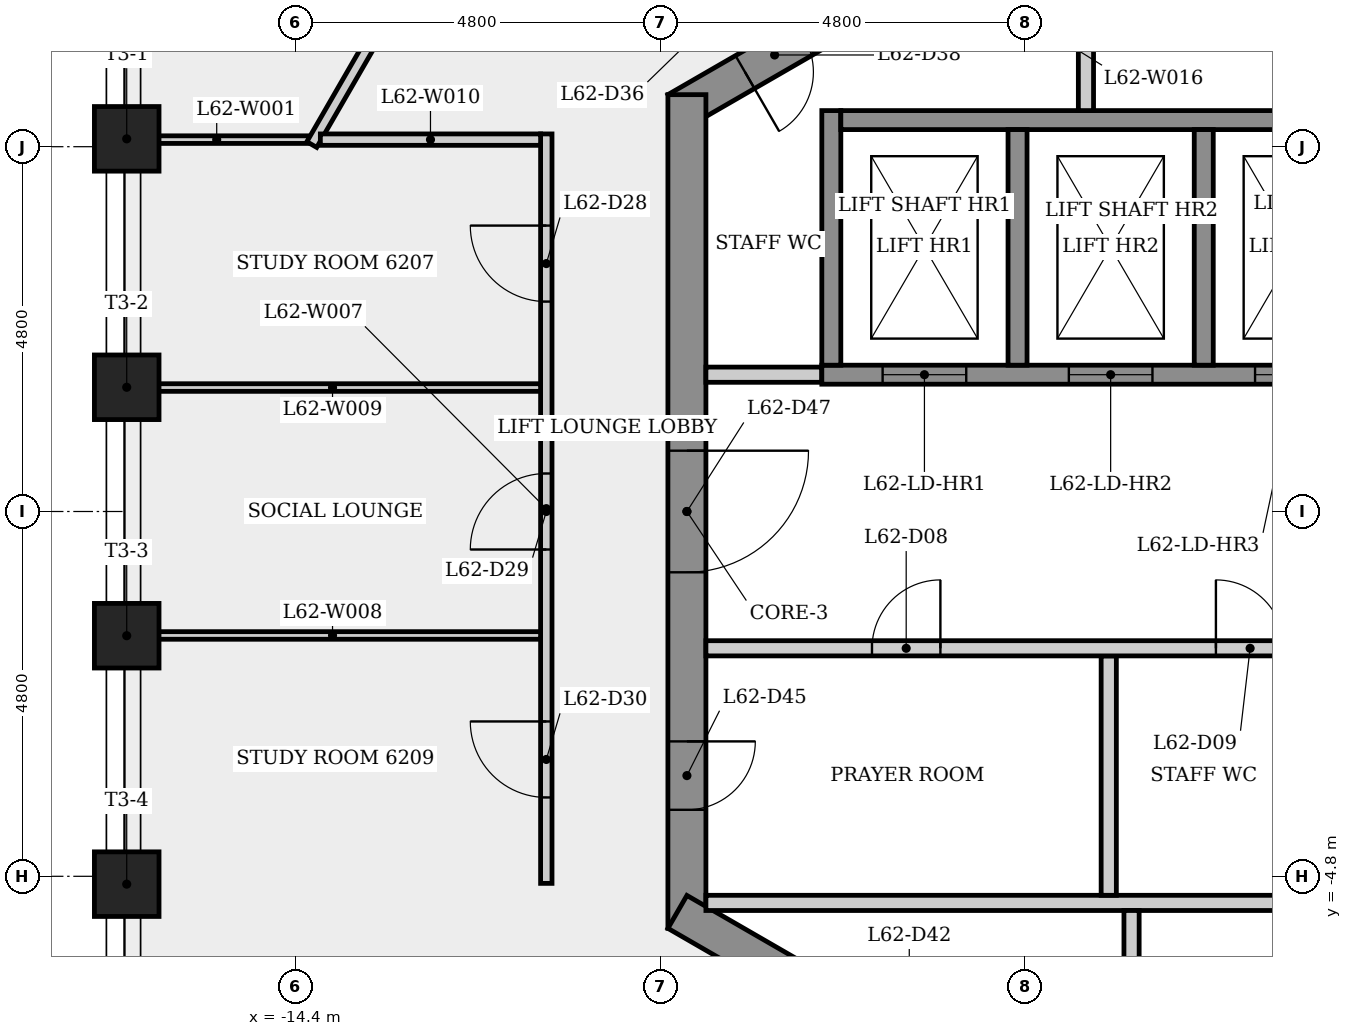
"""IFC4 building model, lengths in metres.
Left out: names, types, materials, properties, quantities, classifications, styles, units other than length and angle.
Written with IfcOpenShell. Run it as: python <this file> out.ifc"""

import sys

from ifc_helpers import new_model, si_unit, direction, frame, frame_2d, origin, origin_2d, place, context, subcontext, project, spatial, rectangle, extrude, element, fill, save


model = new_model("IFC4")
c1 = context("Model", 3, precision=1e-05, world=origin(), true_north=direction((0.0, 1.0)))
c2 = subcontext(c1, "Body", "Model", "MODEL_VIEW")
j1 = project(units=[si_unit("LENGTHUNIT", "METRE"), si_unit("PLANEANGLEUNIT", "RADIAN")], contexts=[c1])
p1 = place(None, origin())
s1 = spatial("IfcSite", under=j1, at=p1, CompositionType="ELEMENT")
p2 = place(p1, origin())
s2 = spatial("IfcBuilding", under=s1, at=p2, CompositionType="ELEMENT")
p3 = place(p2, frame((0.0, 0.0, 232.5)))
s3 = spatial("IfcBuildingStorey", under=s2, at=p3, CompositionType="ELEMENT", Elevation=232.5)
p4 = place(p3, frame((0.125, 10.753, 0.0), z_axis=(0.0, 0.0, 1.0), x_axis=(-0.866023993627, -0.500002442456, 0.0)))
e1 = element("IfcWall", 1, at=p4, inside=s3, PredefinedType="SHEAR", context=c2, shape_type="SweptSolid", body=[
    extrude(rectangle(XDim=10.97, YDim=0.5, at=frame_2d((5.485, 0.0))), origin(), (0.0, 0.0, 1.0), 3.4),
])
p5 = place(p4, frame((9.043, 0.0, 0.0)))
e2 = element("IfcOpeningElement", 2, at=p5, cuts=e1, PredefinedType="OPENING", context=c2, shape_type="SweptSolid", body=[
    extrude(rectangle(XDim=0.9, YDim=2.1, at=frame_2d((0.45, 1.05))), frame((0.0, 0.26, 0.0), z_axis=(0.0, -1.0, 0.0), x_axis=(1.0, 0.0, 0.0)), (0.0, 0.0, 1.0), 0.52),
])
p6 = place(p4, frame((2.38, 0.0, 0.0)))
e3 = element("IfcOpeningElement", 3, at=p6, cuts=e1, PredefinedType="OPENING", context=c2, shape_type="SweptSolid", body=[
    extrude(rectangle(XDim=0.9, YDim=2.1, at=frame_2d((0.45, 1.05))), frame((0.0, 0.26, 0.0), z_axis=(0.0, -1.0, 0.0), x_axis=(1.0, 0.0, 0.0)), (0.0, 0.0, 1.0), 0.52),
])
p7 = place(p3, frame((-9.25, 5.485, 0.0), z_axis=(0.0, 0.0, 1.0), x_axis=(0.0, -1.0, 0.0)))
e4 = element("IfcWall", 4, at=p7, inside=s3, PredefinedType="SHEAR", context=c2, shape_type="SweptSolid", body=[
    extrude(rectangle(XDim=10.97, YDim=0.5, at=frame_2d((5.485, 0.0))), origin(), (0.0, 0.0, 1.0), 3.4),
])
p8 = place(p7, frame((8.51, 0.0, 0.0)))
e5 = element("IfcOpeningElement", 5, at=p8, cuts=e4, PredefinedType="OPENING", context=c2, shape_type="SweptSolid", body=[
    extrude(rectangle(XDim=0.9, YDim=2.1, at=frame_2d((0.45, 1.05))), frame((0.0, 0.26, 0.0), z_axis=(0.0, -1.0, 0.0), x_axis=(1.0, 0.0, 0.0)), (0.0, 0.0, 1.0), 0.52),
])
p9 = place(p7, frame((4.685, 0.0, 0.0)))
e6 = element("IfcOpeningElement", 6, at=p9, cuts=e4, PredefinedType="OPENING", context=c2, shape_type="SweptSolid", body=[
    extrude(rectangle(XDim=1.6, YDim=2.1, at=frame_2d((0.8, 1.05))), frame((0.0, 0.26, 0.0), z_axis=(0.0, -1.0, 0.0), x_axis=(1.0, 0.0, 0.0)), (0.0, 0.0, 1.0), 0.52),
])
p10 = place(p3, frame((-9.375, -5.268, 0.0), z_axis=(0.0, 0.0, 1.0), x_axis=(0.866023993627, -0.500002442456, 0.0)))
e7 = element("IfcWall", 7, at=p10, inside=s3, PredefinedType="SHEAR", context=c2, shape_type="SweptSolid", body=[
    extrude(rectangle(XDim=10.97, YDim=0.5, at=frame_2d((5.485, 0.0))), origin(), (0.0, 0.0, 1.0), 3.4),
])
p11 = place(p10, frame((3.073, 0.0, 0.0)))
e8 = element("IfcOpeningElement", 8, at=p11, cuts=e7, PredefinedType="OPENING", context=c2, shape_type="SweptSolid", body=[
    extrude(rectangle(XDim=0.9, YDim=2.1, at=frame_2d((0.45, 1.05))), frame((0.0, 0.26, 0.0), z_axis=(0.0, -1.0, 0.0), x_axis=(1.0, 0.0, 0.0)), (0.0, 0.0, 1.0), 0.52),
])
p12 = place(p10, frame((8.267, 0.0, 0.0)))
e9 = element("IfcOpeningElement", 9, at=p12, cuts=e7, PredefinedType="OPENING", context=c2, shape_type="SweptSolid", body=[
    extrude(rectangle(XDim=0.9, YDim=2.1, at=frame_2d((0.45, 1.05))), frame((0.0, 0.26, 0.0), z_axis=(0.0, -1.0, 0.0), x_axis=(1.0, 0.0, 0.0)), (0.0, 0.0, 1.0), 0.52),
])
for number, where, z_axis, x_axis in (
    (10, (-16.62, 4.903, 0.0), (0.0, 0.0, 1.0), (-1.0, 0.0, 0.0)),
    (11, (-16.62, 1.635, 0.0), (0.0, 0.0, 1.0), (-1.0, 0.0, 0.0)),
    (12, (-16.62, -1.635, 0.0), (0.0, 0.0, 1.0), (-1.0, 0.0, 0.0)),
    (13, (-16.62, -4.903, 0.0), (0.0, 0.0, 1.0), (-1.0, 0.0, 0.0)),
):
    element("IfcColumn", number, at=place(p3, frame(where, z_axis=z_axis, x_axis=x_axis)), inside=s3, PredefinedType="COLUMN", context=c2, shape_type="SweptSolid", body=[
        extrude(rectangle(XDim=0.85, YDim=0.85, at=origin_2d()), origin(), (0.0, 0.0, 1.0), 3.4),
    ])
p13 = place(p3, frame((-14.223, 4.893, 0.0), z_axis=(0.0, 0.0, 1.0), x_axis=(-1.0, 0.0, 0.0)))
e14 = element("IfcWall", 14, at=p13, inside=s3, PredefinedType="PARTITIONING", context=c2, shape_type="SweptSolid", body=[
    extrude(rectangle(XDim=2.427, YDim=0.1, at=frame_2d((1.214, 0.0))), origin(), (0.0, 0.0, 1.0), 3.05),
])
p14 = place(p3, frame((-14.185, 4.828, 0.0), z_axis=(0.0, 0.0, 1.0), x_axis=(0.50002117804, 0.866013176292, 0.0)))
e15 = element("IfcWall", 15, at=p14, inside=s3, PredefinedType="PARTITIONING", context=c2, shape_type="SweptSolid", body=[
    extrude(rectangle(XDim=6.108, YDim=0.15, at=frame_2d((3.054, 0.0))), origin(), (0.0, 0.0, 1.0), 3.05),
])
p15 = place(p14, frame((2.554, 0.0, 0.0)))
e16 = element("IfcOpeningElement", 16, at=p15, cuts=e15, PredefinedType="OPENING", context=c2, shape_type="SweptSolid", body=[
    extrude(rectangle(XDim=1.0, YDim=2.1, at=frame_2d((0.5, 1.05))), frame((0.0, 0.085, 0.0), z_axis=(0.0, -1.0, 0.0), x_axis=(1.0, 0.0, 0.0)), (0.0, 0.0, 1.0), 0.17),
])
p16 = place(p3, frame((-11.1, -4.893, 0.0), z_axis=(0.0, 0.0, 1.0), x_axis=(0.0, 1.0, 0.0)))
e17 = element("IfcWall", 17, at=p16, inside=s3, PredefinedType="PARTITIONING", context=c2, shape_type="SweptSolid", body=[
    extrude(rectangle(XDim=9.861, YDim=0.15, at=frame_2d((4.931, 0.0))), origin(), (0.0, 0.0, 1.0), 3.05),
])
p17 = place(p16, frame((7.655, 0.0, 0.0)))
e18 = element("IfcOpeningElement", 18, at=p17, cuts=e17, PredefinedType="OPENING", context=c2, shape_type="SweptSolid", body=[
    extrude(rectangle(XDim=1.0, YDim=2.1, at=frame_2d((0.5, 1.05))), frame((0.0, 0.085, 0.0), z_axis=(0.0, -1.0, 0.0), x_axis=(1.0, 0.0, 0.0)), (0.0, 0.0, 1.0), 0.17),
])
p18 = place(p16, frame((4.393, 0.0, 0.0)))
e19 = element("IfcOpeningElement", 19, at=p18, cuts=e17, PredefinedType="OPENING", context=c2, shape_type="SweptSolid", body=[
    extrude(rectangle(XDim=1.0, YDim=2.1, at=frame_2d((0.5, 1.05))), frame((0.0, 0.085, 0.0), z_axis=(0.0, -1.0, 0.0), x_axis=(1.0, 0.0, 0.0)), (0.0, 0.0, 1.0), 0.17),
])
p19 = place(p16, frame((1.131, 0.0, 0.0)))
e20 = element("IfcOpeningElement", 20, at=p19, cuts=e17, PredefinedType="OPENING", context=c2, shape_type="SweptSolid", body=[
    extrude(rectangle(XDim=1.0, YDim=2.1, at=frame_2d((0.5, 1.05))), frame((0.0, 0.085, 0.0), z_axis=(0.0, -1.0, 0.0), x_axis=(1.0, 0.0, 0.0)), (0.0, 0.0, 1.0), 0.17),
])
for number, where, z_axis, x_axis in (
    (21, (-11.175, -1.631, 0.0), (0.0, 0.0, 1.0), (-1.0, 0.0, 0.0)),
    (22, (-11.175, 1.631, 0.0), (0.0, 0.0, 1.0), (-1.0, 0.0, 0.0)),
):
    element("IfcWall", number, at=place(p3, frame(where, z_axis=z_axis, x_axis=x_axis)), inside=s3, PredefinedType="PARTITIONING", context=c2, shape_type="SweptSolid", body=[
        extrude(rectangle(XDim=5.475, YDim=0.1, at=frame_2d((2.738, 0.0))), origin(), (0.0, 0.0, 1.0), 3.05),
    ])
p20 = place(p3, frame((-11.175, 4.893, 0.0), z_axis=(0.0, 0.0, 1.0), x_axis=(-1.0, 0.0, 0.0)))
e23 = element("IfcWall", 23, at=p20, inside=s3, PredefinedType="PARTITIONING", context=c2, shape_type="SweptSolid", body=[
    extrude(rectangle(XDim=2.898, YDim=0.15, at=frame_2d((1.449, 0.0))), origin(), (0.0, 0.0, 1.0), 3.05),
])
p21 = place(p3, frame((-9.0, 1.8, 0.0), z_axis=(0.0, 0.0, 1.0), x_axis=(1.0, 0.0, 0.0)))
e24 = element("IfcWall", 24, at=p21, inside=s3, PredefinedType="PARTITIONING", context=c2, shape_type="SweptSolid", body=[
    extrude(rectangle(XDim=1.525, YDim=0.2, at=frame_2d((0.763, 0.0))), origin(), (0.0, 0.0, 1.0), 3.05),
])
p22 = place(p3, frame((-9.0, -5.15, 0.0), z_axis=(0.0, 0.0, 1.0), x_axis=(1.0, 0.0, 0.0)))
e25 = element("IfcWall", 25, at=p22, inside=s3, PredefinedType="PARTITIONING", context=c2, shape_type="SweptSolid", body=[
    extrude(rectangle(XDim=11.325, YDim=0.2, at=frame_2d((5.663, 0.0))), origin(), (0.0, 0.0, 1.0), 3.05),
])
p23 = place(p3, frame((-7.475, 1.8, 0.0), z_axis=(0.0, 0.0, 1.0), x_axis=(1.0, 0.0, 0.0)))
e26 = element("IfcWall", 26, at=p23, inside=s3, PredefinedType="SHEAR", context=c2, shape_type="SweptSolid", body=[
    extrude(rectangle(XDim=14.95, YDim=0.25, at=frame_2d((7.475, 0.0))), origin(), (0.0, 0.0, 1.0), 3.05),
])
p24 = place(p23, frame((0.8, 0.0, 0.0)))
e27 = element("IfcOpeningElement", 27, at=p24, cuts=e26, PredefinedType="OPENING", context=c2, shape_type="SweptSolid", body=[
    extrude(rectangle(XDim=1.1, YDim=2.1, at=frame_2d((0.55, 1.05))), frame((0.0, 0.135, 0.0), z_axis=(0.0, -1.0, 0.0), x_axis=(1.0, 0.0, 0.0)), (0.0, 0.0, 1.0), 0.27),
])
p25 = place(p23, frame((3.25, 0.0, 0.0)))
e28 = element("IfcOpeningElement", 28, at=p25, cuts=e26, PredefinedType="OPENING", context=c2, shape_type="SweptSolid", body=[
    extrude(rectangle(XDim=1.1, YDim=2.1, at=frame_2d((0.55, 1.05))), frame((0.0, 0.135, 0.0), z_axis=(0.0, -1.0, 0.0), x_axis=(1.0, 0.0, 0.0)), (0.0, 0.0, 1.0), 0.27),
])
p26 = place(p23, frame((5.7, 0.0, 0.0)))
e29 = element("IfcOpeningElement", 29, at=p26, cuts=e26, PredefinedType="OPENING", context=c2, shape_type="SweptSolid", body=[
    extrude(rectangle(XDim=1.1, YDim=2.1, at=frame_2d((0.55, 1.05))), frame((0.0, 0.135, 0.0), z_axis=(0.0, -1.0, 0.0), x_axis=(1.0, 0.0, 0.0)), (0.0, 0.0, 1.0), 0.27),
])
p27 = place(p23, frame((8.15, 0.0, 0.0)))
e30 = element("IfcOpeningElement", 30, at=p27, cuts=e26, PredefinedType="OPENING", context=c2, shape_type="SweptSolid", body=[
    extrude(rectangle(XDim=1.1, YDim=2.1, at=frame_2d((0.55, 1.05))), frame((0.0, 0.135, 0.0), z_axis=(0.0, -1.0, 0.0), x_axis=(1.0, 0.0, 0.0)), (0.0, 0.0, 1.0), 0.27),
])
p28 = place(p23, frame((10.6, 0.0, 0.0)))
e31 = element("IfcOpeningElement", 31, at=p28, cuts=e26, PredefinedType="OPENING", context=c2, shape_type="SweptSolid", body=[
    extrude(rectangle(XDim=1.1, YDim=2.1, at=frame_2d((0.55, 1.05))), frame((0.0, 0.135, 0.0), z_axis=(0.0, -1.0, 0.0), x_axis=(1.0, 0.0, 0.0)), (0.0, 0.0, 1.0), 0.27),
])
p29 = place(p23, frame((13.05, 0.0, 0.0)))
e32 = element("IfcOpeningElement", 32, at=p29, cuts=e26, PredefinedType="OPENING", context=c2, shape_type="SweptSolid", body=[
    extrude(rectangle(XDim=1.1, YDim=2.1, at=frame_2d((0.55, 1.05))), frame((0.0, 0.135, 0.0), z_axis=(0.0, -1.0, 0.0), x_axis=(1.0, 0.0, 0.0)), (0.0, 0.0, 1.0), 0.27),
])
p30 = place(p3, frame((-7.35, 1.925, 0.0), z_axis=(0.0, 0.0, 1.0), x_axis=(0.0, 1.0, 0.0)))
e33 = element("IfcWall", 33, at=p30, inside=s3, PredefinedType="SHEAR", context=c2, shape_type="SweptSolid", body=[
    extrude(rectangle(XDim=3.35, YDim=0.25, at=frame_2d((1.675, 0.0))), origin(), (0.0, 0.0, 1.0), 3.05),
])
p31 = place(p3, frame((-7.225, 5.15, 0.0), z_axis=(0.0, 0.0, 1.0), x_axis=(1.0, 0.0, 0.0)))
e34 = element("IfcWall", 34, at=p31, inside=s3, PredefinedType="SHEAR", context=c2, shape_type="SweptSolid", body=[
    extrude(rectangle(XDim=14.7, YDim=0.25, at=frame_2d((7.35, 0.0))), origin(), (0.0, 0.0, 1.0), 3.05),
])
p32 = place(p3, frame((-4.9, 5.025, 0.0), z_axis=(0.0, 0.0, 1.0), x_axis=(0.0, -1.0, 0.0)))
e35 = element("IfcWall", 35, at=p32, inside=s3, PredefinedType="SHEAR", context=c2, shape_type="SweptSolid", body=[
    extrude(rectangle(XDim=3.1, YDim=0.25, at=frame_2d((1.55, 0.0))), origin(), (0.0, 0.0, 1.0), 3.4),
])
p33 = place(p3, frame((-4.0, 8.083, 0.0), z_axis=(0.0, 0.0, 1.0), x_axis=(0.0, -1.0, 0.0)))
e36 = element("IfcWall", 36, at=p33, inside=s3, PredefinedType="PARTITIONING", context=c2, shape_type="SweptSolid", body=[
    extrude(rectangle(XDim=2.808, YDim=0.2, at=frame_2d((1.404, 0.0))), origin(), (0.0, 0.0, 1.0), 3.05),
])
p34 = place(p3, frame((-3.7, -1.9, 0.0), z_axis=(0.0, 0.0, 1.0), x_axis=(0.0, -1.0, 0.0)))
e37 = element("IfcWall", 37, at=p34, inside=s3, PredefinedType="PARTITIONING", context=c2, shape_type="SweptSolid", body=[
    extrude(rectangle(XDim=3.15, YDim=0.2, at=frame_2d((1.575, 0.0))), origin(), (0.0, 0.0, 1.0), 3.05),
])
p35 = place(p3, frame((-9.0, -1.8, 0.0), z_axis=(0.0, 0.0, 1.0), x_axis=(1.0, 0.0, 0.0)))
e38 = element("IfcWall", 38, at=p35, inside=s3, PredefinedType="PARTITIONING", context=c2, shape_type="SweptSolid", body=[
    extrude(rectangle(XDim=11.325, YDim=0.2, at=frame_2d((5.663, 0.0))), origin(), (0.0, 0.0, 1.0), 3.05),
])
p36 = place(p35, frame((2.185, 0.0, 0.0)))
e39 = element("IfcOpeningElement", 39, at=p36, cuts=e38, PredefinedType="OPENING", context=c2, shape_type="SweptSolid", body=[
    extrude(rectangle(XDim=0.9, YDim=2.1, at=frame_2d((0.45, 1.05))), frame((0.0, 0.11, 0.0), z_axis=(0.0, -1.0, 0.0), x_axis=(1.0, 0.0, 0.0)), (0.0, 0.0, 1.0), 0.22),
])
p37 = place(p35, frame((6.71, 0.0, 0.0)))
e40 = element("IfcOpeningElement", 40, at=p37, cuts=e38, PredefinedType="OPENING", context=c2, shape_type="SweptSolid", body=[
    extrude(rectangle(XDim=0.9, YDim=2.1, at=frame_2d((0.45, 1.05))), frame((0.0, 0.11, 0.0), z_axis=(0.0, -1.0, 0.0), x_axis=(1.0, 0.0, 0.0)), (0.0, 0.0, 1.0), 0.22),
])
p38 = place(p35, frame((9.713, 0.0, 0.0)))
e41 = element("IfcOpeningElement", 41, at=p38, cuts=e38, PredefinedType="OPENING", context=c2, shape_type="SweptSolid", body=[
    extrude(rectangle(XDim=0.9, YDim=2.1, at=frame_2d((0.45, 1.05))), frame((0.0, 0.11, 0.0), z_axis=(0.0, -1.0, 0.0), x_axis=(1.0, 0.0, 0.0)), (0.0, 0.0, 1.0), 0.22),
])
p39 = place(p3, frame((-3.4, -5.25, 0.0), z_axis=(0.0, 0.0, 1.0), x_axis=(0.0, -1.0, 0.0)))
e42 = element("IfcWall", 42, at=p39, inside=s3, PredefinedType="PARTITIONING", context=c2, shape_type="SweptSolid", body=[
    extrude(rectangle(XDim=3.179, YDim=0.2, at=frame_2d((1.59, 0.0))), origin(), (0.0, 0.0, 1.0), 3.05),
])
p40 = place(p3, frame((-2.45, 5.025, 0.0), z_axis=(0.0, 0.0, 1.0), x_axis=(0.0, -1.0, 0.0)))
e43 = element("IfcWall", 43, at=p40, inside=s3, PredefinedType="SHEAR", context=c2, shape_type="SweptSolid", body=[
    extrude(rectangle(XDim=3.1, YDim=0.25, at=frame_2d((1.55, 0.0))), origin(), (0.0, 0.0, 1.0), 3.4),
])
p41 = place(p24, origin())
e44 = element("IfcDoor", 44, at=p41, inside=s3, OperationType="SLIDING_TO_LEFT", PredefinedType="DOOR", context=c2, shape_type="SweptSolid", body=[
    extrude(rectangle(XDim=1.1, YDim=2.1, at=frame_2d((0.55, 1.05))), frame((0.0, 0.025, 0.0), z_axis=(0.0, -1.0, 0.0), x_axis=(1.0, 0.0, 0.0)), (0.0, 0.0, 1.0), 0.05),
])
fill(e27, e44)
p42 = place(p25, origin())
e45 = element("IfcDoor", 45, at=p42, inside=s3, OperationType="SLIDING_TO_LEFT", PredefinedType="DOOR", context=c2, shape_type="SweptSolid", body=[
    extrude(rectangle(XDim=1.1, YDim=2.1, at=frame_2d((0.55, 1.05))), frame((0.0, 0.025, 0.0), z_axis=(0.0, -1.0, 0.0), x_axis=(1.0, 0.0, 0.0)), (0.0, 0.0, 1.0), 0.05),
])
fill(e28, e45)
p43 = place(p26, origin())
e46 = element("IfcDoor", 46, at=p43, inside=s3, OperationType="SLIDING_TO_LEFT", PredefinedType="DOOR", context=c2, shape_type="SweptSolid", body=[
    extrude(rectangle(XDim=1.1, YDim=2.1, at=frame_2d((0.55, 1.05))), frame((0.0, 0.025, 0.0), z_axis=(0.0, -1.0, 0.0), x_axis=(1.0, 0.0, 0.0)), (0.0, 0.0, 1.0), 0.05),
])
fill(e29, e46)
p44 = place(p36, origin())
e47 = element("IfcDoor", 47, at=p44, inside=s3, OperationType="SINGLE_SWING_RIGHT", PredefinedType="DOOR", context=c2, shape_type="SweptSolid", body=[
    extrude(rectangle(XDim=0.9, YDim=2.1, at=frame_2d((0.45, 1.05))), frame((0.0, 0.025, 0.0), z_axis=(0.0, -1.0, 0.0), x_axis=(1.0, 0.0, 0.0)), (0.0, 0.0, 1.0), 0.05),
])
fill(e39, e47)
p45 = place(p37, origin())
e48 = element("IfcDoor", 48, at=p45, inside=s3, OperationType="SINGLE_SWING_LEFT", PredefinedType="DOOR", context=c2, shape_type="SweptSolid", body=[
    extrude(rectangle(XDim=0.9, YDim=2.1, at=frame_2d((0.45, 1.05))), frame((0.0, 0.025, 0.0), z_axis=(0.0, -1.0, 0.0), x_axis=(1.0, 0.0, 0.0)), (0.0, 0.0, 1.0), 0.05),
])
fill(e40, e48)
p46 = place(p17, origin())
e49 = element("IfcDoor", 49, at=p46, inside=s3, OperationType="SINGLE_SWING_RIGHT", PredefinedType="DOOR", context=c2, shape_type="SweptSolid", body=[
    extrude(rectangle(XDim=1.0, YDim=2.1, at=frame_2d((0.5, 1.05))), frame((0.0, 0.025, 0.0), z_axis=(0.0, -1.0, 0.0), x_axis=(1.0, 0.0, 0.0)), (0.0, 0.0, 1.0), 0.05),
])
fill(e18, e49)
p47 = place(p18, origin())
e50 = element("IfcDoor", 50, at=p47, inside=s3, OperationType="SINGLE_SWING_LEFT", PredefinedType="DOOR", context=c2, shape_type="SweptSolid", body=[
    extrude(rectangle(XDim=1.0, YDim=2.1, at=frame_2d((0.5, 1.05))), frame((0.0, 0.025, 0.0), z_axis=(0.0, -1.0, 0.0), x_axis=(1.0, 0.0, 0.0)), (0.0, 0.0, 1.0), 0.05),
])
fill(e19, e50)
p48 = place(p19, origin())
e51 = element("IfcDoor", 51, at=p48, inside=s3, OperationType="SINGLE_SWING_RIGHT", PredefinedType="DOOR", context=c2, shape_type="SweptSolid", body=[
    extrude(rectangle(XDim=1.0, YDim=2.1, at=frame_2d((0.5, 1.05))), frame((0.0, 0.025, 0.0), z_axis=(0.0, -1.0, 0.0), x_axis=(1.0, 0.0, 0.0)), (0.0, 0.0, 1.0), 0.05),
])
fill(e20, e51)
p49 = place(p5, origin())
e52 = element("IfcDoor", 52, at=p49, inside=s3, OperationType="SINGLE_SWING_RIGHT", PredefinedType="DOOR", context=c2, shape_type="SweptSolid", body=[
    extrude(rectangle(XDim=0.9, YDim=2.1, at=frame_2d((0.45, 1.05))), frame((0.0, 0.025, 0.0), z_axis=(0.0, -1.0, 0.0), x_axis=(1.0, 0.0, 0.0)), (0.0, 0.0, 1.0), 0.05),
])
fill(e2, e52)
p50 = place(p8, origin())
e53 = element("IfcDoor", 53, at=p50, inside=s3, OperationType="SINGLE_SWING_LEFT", PredefinedType="DOOR", context=c2, shape_type="SweptSolid", body=[
    extrude(rectangle(XDim=0.9, YDim=2.1, at=frame_2d((0.45, 1.05))), frame((0.0, 0.025, 0.0), z_axis=(0.0, -1.0, 0.0), x_axis=(1.0, 0.0, 0.0)), (0.0, 0.0, 1.0), 0.05),
])
fill(e5, e53)
p51 = place(p9, origin())
e54 = element("IfcDoor", 54, at=p51, inside=s3, OperationType="SINGLE_SWING_LEFT", PredefinedType="DOOR", context=c2, shape_type="SweptSolid", body=[
    extrude(rectangle(XDim=1.6, YDim=2.1, at=frame_2d((0.8, 1.05))), frame((0.0, 0.025, 0.0), z_axis=(0.0, -1.0, 0.0), x_axis=(1.0, 0.0, 0.0)), (0.0, 0.0, 1.0), 0.05),
])
fill(e6, e54)
save(model, sys.argv[1])
